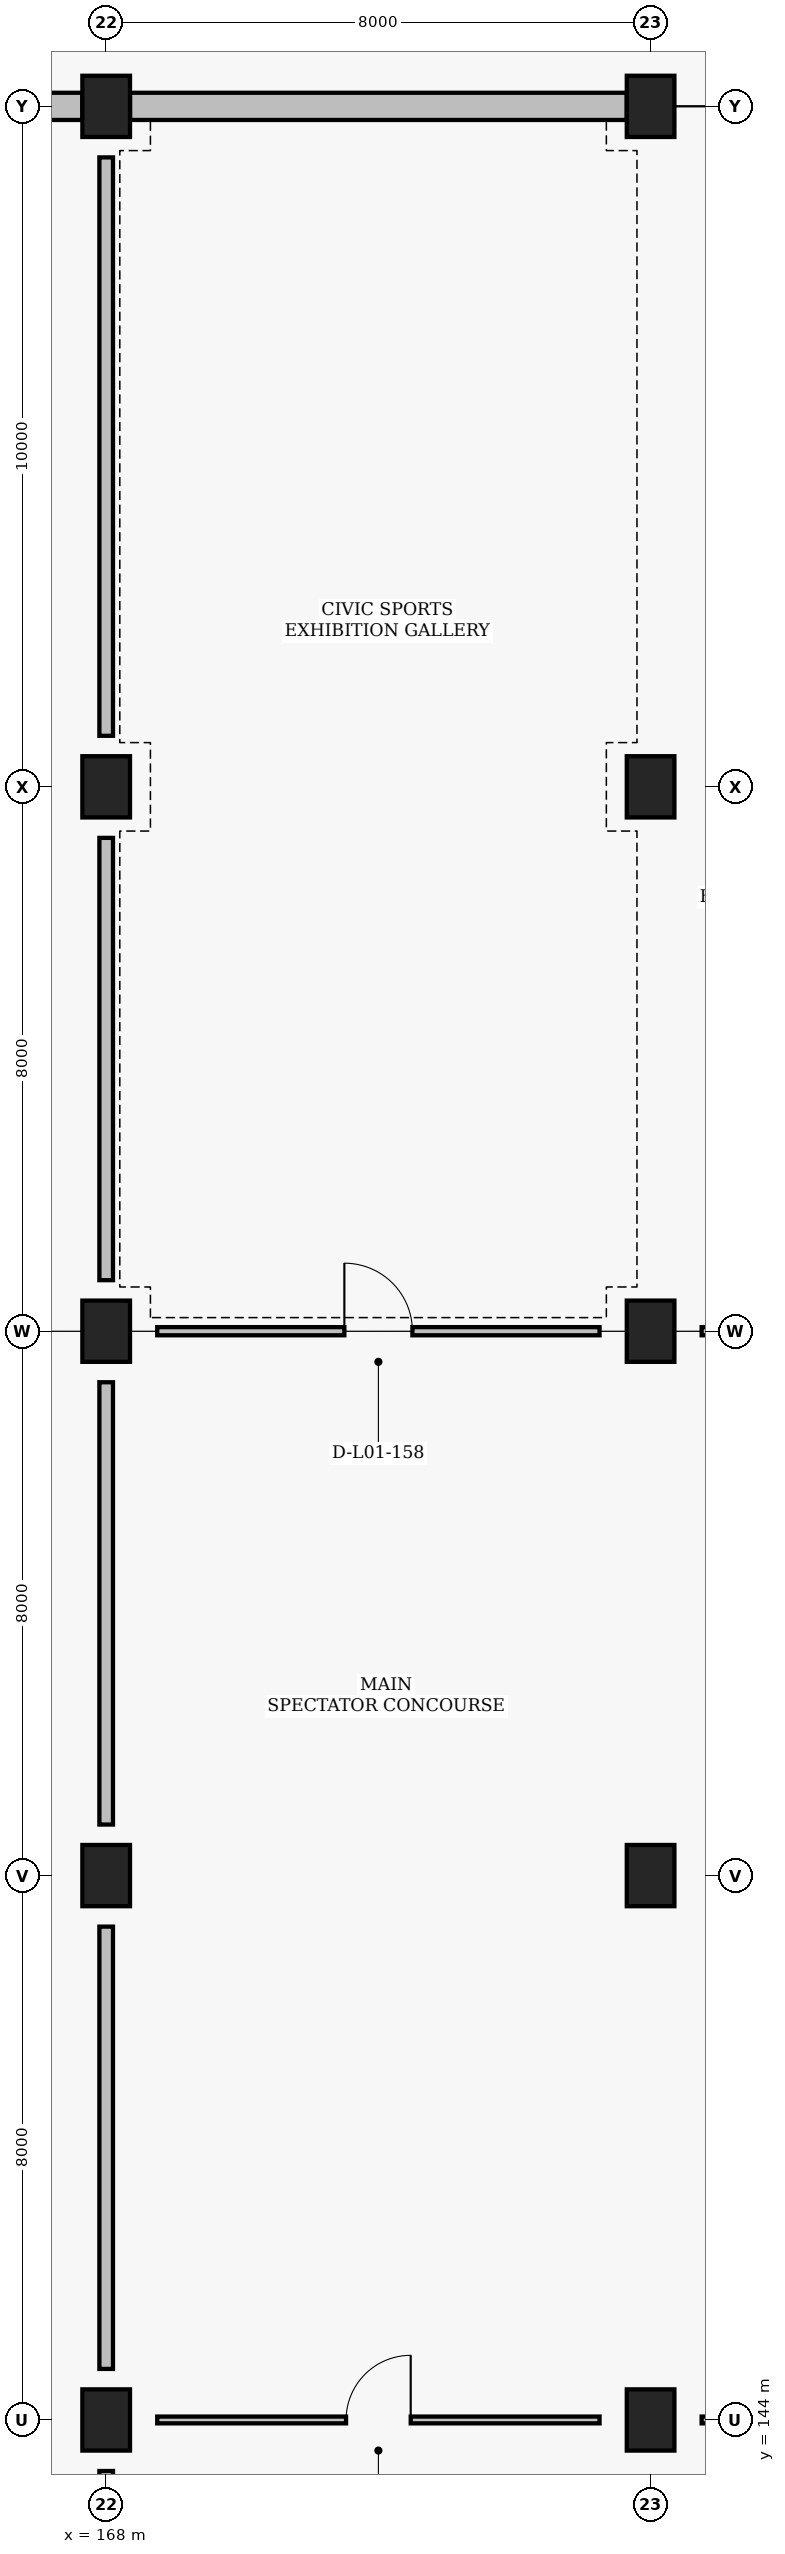
"""IFC4 building model, lengths in metres.
Left out: names, types, materials, properties, quantities, classifications, styles, units other than length and angle.
Written with IfcOpenShell. Run it as: python <this file> out.ifc"""

import sys

from ifc_helpers import new_model, si_unit, direction, frame, frame_2d, origin, origin_2d, place, context, subcontext, project, spatial, rectangle, extrude, element, fill, save


model = new_model("IFC4")
c1 = context("Model", 3, precision=1e-05, world=origin(), true_north=direction((0.0, 1.0)))
c2 = subcontext(c1, "Body", "Model", "MODEL_VIEW")
j1 = project(units=[si_unit("LENGTHUNIT", "METRE"), si_unit("PLANEANGLEUNIT", "RADIAN")], contexts=[c1])
p1 = place(None, origin())
s1 = spatial("IfcSite", under=j1, at=p1, CompositionType="ELEMENT")
p2 = place(p1, origin())
s2 = spatial("IfcBuilding", under=s1, at=p2, CompositionType="ELEMENT")
p3 = place(p2, origin())
s3 = spatial("IfcBuildingStorey", under=s2, at=p3, CompositionType="ELEMENT", Elevation=0.0)
for number, where, z_axis, x_axis in (
    (1, (168.0, 144.0, 0.0), (0.0, 0.0, 1.0), (1.0, 0.0, 0.0)),
    (2, (168.0, 152.0, 0.0), (0.0, 0.0, 1.0), (1.0, 0.0, 0.0)),
    (3, (168.0, 160.0, 0.0), (0.0, 0.0, 1.0), (1.0, 0.0, 0.0)),
    (4, (168.0, 168.0, 0.0), (0.0, 0.0, 1.0), (1.0, 0.0, 0.0)),
    (5, (168.0, 178.0, 0.0), (0.0, 0.0, 1.0), (1.0, 0.0, 0.0)),
    (6, (176.0, 144.0, 0.0), (0.0, 0.0, 1.0), (1.0, 0.0, 0.0)),
    (7, (176.0, 152.0, 0.0), (0.0, 0.0, 1.0), (1.0, 0.0, 0.0)),
    (8, (176.0, 160.0, 0.0), (0.0, 0.0, 1.0), (1.0, 0.0, 0.0)),
    (9, (176.0, 168.0, 0.0), (0.0, 0.0, 1.0), (1.0, 0.0, 0.0)),
    (10, (176.0, 178.0, 0.0), (0.0, 0.0, 1.0), (1.0, 0.0, 0.0)),
):
    element("IfcColumn", number, at=place(p3, frame(where, z_axis=z_axis, x_axis=x_axis)), inside=s3, PredefinedType="COLUMN", context=c2, shape_type="SweptSolid", body=[
        extrude(rectangle(XDim=0.7, YDim=0.9, at=origin_2d()), origin(), (0.0, 0.0, 1.0), 4.8),
    ])
p4 = place(p3, frame((160.35, 178.0, 0.0), z_axis=(0.0, 0.0, 1.0), x_axis=(1.0, 0.0, 0.0)))
e11 = element("IfcWall", 11, at=p4, inside=s3, PredefinedType="SOLIDWALL", context=c2, shape_type="SweptSolid", body=[
    extrude(rectangle(XDim=7.3, YDim=0.4, at=frame_2d((3.65, 0.0))), origin(), (0.0, 0.0, 1.0), 3.71),
])
p5 = place(p4, frame((2.95, 0.0, 0.0)))
e12 = element("IfcOpeningElement", 12, at=p5, cuts=e11, PredefinedType="OPENING", context=c2, shape_type="SweptSolid", body=[
    extrude(rectangle(XDim=1.4, YDim=2.2, at=frame_2d((0.7, 1.1))), frame((0.0, 0.21, 0.0), z_axis=(0.0, -1.0, 0.0), x_axis=(1.0, 0.0, 0.0)), (0.0, 0.0, 1.0), 0.42),
])
p6 = place(p3, frame((168.35, 178.0, 0.0), z_axis=(0.0, 0.0, 1.0), x_axis=(1.0, 0.0, 0.0)))
e13 = element("IfcWall", 13, at=p6, inside=s3, PredefinedType="SOLIDWALL", context=c2, shape_type="SweptSolid", body=[
    extrude(rectangle(XDim=7.3, YDim=0.4, at=frame_2d((3.65, 0.0))), origin(), (0.0, 0.0, 1.0), 3.71),
])
for number, where, z_axis, x_axis in (
    (14, (168.0, 136.75, 0.0), (0.0, 0.0, 1.0), (0.0, 1.0, 0.0)),
    (15, (168.0, 144.75, 0.0), (0.0, 0.0, 1.0), (0.0, 1.0, 0.0)),
    (16, (168.0, 152.75, 0.0), (0.0, 0.0, 1.0), (0.0, 1.0, 0.0)),
    (17, (168.0, 160.75, 0.0), (0.0, 0.0, 1.0), (0.0, 1.0, 0.0)),
):
    element("IfcWall", number, at=place(p3, frame(where, z_axis=z_axis, x_axis=x_axis)), inside=s3, PredefinedType="PARTITIONING", context=c2, shape_type="SweptSolid", body=[
        extrude(rectangle(XDim=6.5, YDim=0.2, at=frame_2d((3.25, 0.0))), origin(), (0.0, 0.0, 1.0), 3.81),
    ])
p7 = place(p3, frame((168.0, 168.75, 0.0), z_axis=(0.0, 0.0, 1.0), x_axis=(0.0, 1.0, 0.0)))
e18 = element("IfcWall", 18, at=p7, inside=s3, PredefinedType="PARTITIONING", context=c2, shape_type="SweptSolid", body=[
    extrude(rectangle(XDim=8.5, YDim=0.2, at=frame_2d((4.25, 0.0))), origin(), (0.0, 0.0, 1.0), 3.71),
])
p8 = place(p3, frame((168.75, 144.0, 0.0), z_axis=(0.0, 0.0, 1.0), x_axis=(1.0, 0.0, 0.0)))
e19 = element("IfcWall", 19, at=p8, inside=s3, PredefinedType="PARTITIONING", context=c2, shape_type="SweptSolid", body=[
    extrude(rectangle(XDim=6.5, YDim=0.1, at=frame_2d((3.25, 0.0))), origin(), (0.0, 0.0, 1.0), 3.91),
])
p9 = place(p8, frame((2.775, 0.0, 0.0)))
e20 = element("IfcOpeningElement", 20, at=p9, cuts=e19, PredefinedType="OPENING", context=c2, shape_type="SweptSolid", body=[
    extrude(rectangle(XDim=0.95, YDim=2.1, at=frame_2d((0.475, 1.05))), frame((0.0, 0.06, 0.0), z_axis=(0.0, -1.0, 0.0), x_axis=(1.0, 0.0, 0.0)), (0.0, 0.0, 1.0), 0.12),
])
p10 = place(p3, frame((168.75, 160.0, 0.0), z_axis=(0.0, 0.0, 1.0), x_axis=(1.0, 0.0, 0.0)))
e21 = element("IfcWall", 21, at=p10, inside=s3, PredefinedType="PARTITIONING", context=c2, shape_type="SweptSolid", body=[
    extrude(rectangle(XDim=6.5, YDim=0.12, at=frame_2d((3.25, 0.0))), origin(), (0.0, 0.0, 1.0), 3.91),
])
p11 = place(p10, frame((2.75, 0.0, 0.0)))
e22 = element("IfcOpeningElement", 22, at=p11, cuts=e21, PredefinedType="OPENING", context=c2, shape_type="SweptSolid", body=[
    extrude(rectangle(XDim=1.0, YDim=2.1, at=frame_2d((0.5, 1.05))), frame((0.0, 0.07, 0.0), z_axis=(0.0, -1.0, 0.0), x_axis=(1.0, 0.0, 0.0)), (0.0, 0.0, 1.0), 0.14),
])
p12 = place(p3, frame((176.75, 144.0, 0.0), z_axis=(0.0, 0.0, 1.0), x_axis=(1.0, 0.0, 0.0)))
e23 = element("IfcWall", 23, at=p12, inside=s3, PredefinedType="PARTITIONING", context=c2, shape_type="SweptSolid", body=[
    extrude(rectangle(XDim=6.5, YDim=0.1, at=frame_2d((3.25, 0.0))), origin(), (0.0, 0.0, 1.0), 3.66),
])
p13 = place(p12, frame((2.775, 0.0, 0.0)))
e24 = element("IfcOpeningElement", 24, at=p13, cuts=e23, PredefinedType="OPENING", context=c2, shape_type="SweptSolid", body=[
    extrude(rectangle(XDim=0.95, YDim=2.1, at=frame_2d((0.475, 1.05))), frame((0.0, 0.06, 0.0), z_axis=(0.0, -1.0, 0.0), x_axis=(1.0, 0.0, 0.0)), (0.0, 0.0, 1.0), 0.12),
])
p14 = place(p3, frame((176.75, 160.0, 0.0), z_axis=(0.0, 0.0, 1.0), x_axis=(1.0, 0.0, 0.0)))
e25 = element("IfcWall", 25, at=p14, inside=s3, PredefinedType="PARTITIONING", context=c2, shape_type="SweptSolid", body=[
    extrude(rectangle(XDim=6.5, YDim=0.12, at=frame_2d((3.25, 0.0))), origin(), (0.0, 0.0, 1.0), 3.91),
])
p15 = place(p14, frame((2.75, 0.0, 0.0)))
e26 = element("IfcOpeningElement", 26, at=p15, cuts=e25, PredefinedType="OPENING", context=c2, shape_type="SweptSolid", body=[
    extrude(rectangle(XDim=1.0, YDim=2.1, at=frame_2d((0.5, 1.05))), frame((0.0, 0.07, 0.0), z_axis=(0.0, -1.0, 0.0), x_axis=(1.0, 0.0, 0.0)), (0.0, 0.0, 1.0), 0.14),
])
p16 = place(p9, origin())
e27 = element("IfcDoor", 27, at=p16, inside=s3, OperationType="SINGLE_SWING_RIGHT", PredefinedType="DOOR", context=c2, shape_type="SweptSolid", body=[
    extrude(rectangle(XDim=0.95, YDim=2.1, at=frame_2d((0.475, 1.05))), frame((0.0, 0.025, 0.0), z_axis=(0.0, -1.0, 0.0), x_axis=(1.0, 0.0, 0.0)), (0.0, 0.0, 1.0), 0.05),
])
fill(e20, e27)
p17 = place(p11, origin())
e28 = element("IfcDoor", 28, at=p17, inside=s3, OperationType="SINGLE_SWING_LEFT", PredefinedType="DOOR", context=c2, shape_type="SweptSolid", body=[
    extrude(rectangle(XDim=1.0, YDim=2.1, at=frame_2d((0.5, 1.05))), frame((0.0, 0.025, 0.0), z_axis=(0.0, -1.0, 0.0), x_axis=(1.0, 0.0, 0.0)), (0.0, 0.0, 1.0), 0.05),
])
fill(e22, e28)
save(model, sys.argv[1])
